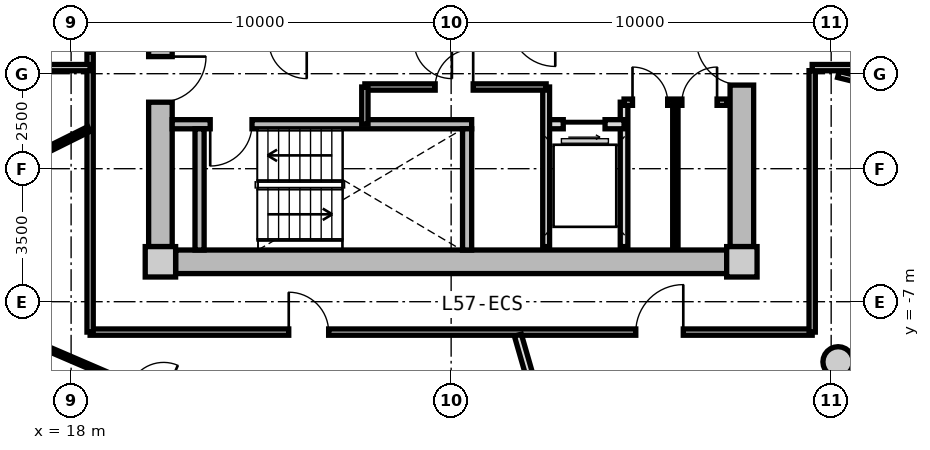
"""IFC4 building model, lengths in metres.
Left out: names, types, materials, properties, quantities, classifications, styles, units other than length and angle.
Written with IfcOpenShell. Run it as: python <this file> out.ifc"""

import sys

from ifc_helpers import new_model, si_unit, direction, frame, frame_2d, origin, origin_2d, place, context, subcontext, project, spatial, rectangle, circle, extrude, source, transform, mapped, element, fill, save


model = new_model("IFC4")
c1 = context("Model", 3, precision=1e-05, world=origin(), true_north=direction((0.0, 1.0)))
c2 = subcontext(c1, "Body", "Model", "MODEL_VIEW")
j1 = project(units=[si_unit("LENGTHUNIT", "METRE"), si_unit("PLANEANGLEUNIT", "RADIAN")], contexts=[c1])
p1 = place(None, origin())
s1 = spatial("IfcSite", under=j1, at=p1, CompositionType="ELEMENT")
p2 = place(p1, origin())
s2 = spatial("IfcBuilding", under=s1, at=p2, CompositionType="ELEMENT")
p3 = place(p2, frame((0.0, 0.0, 183.1)))
s3 = spatial("IfcBuildingStorey", under=s2, at=p3, CompositionType="ELEMENT", Elevation=183.1)
m1 = source(origin(), c2, "Body", "SweptSolid", [
    extrude(rectangle(XDim=0.8, YDim=0.8, at=origin_2d()), origin(), (0.0, 0.0, 1.0), 3.05),
])
for number, where, z_axis, x_axis in (
    (1, (20.35, -5.95, 0.0), (0.0, 0.0, 1.0), (1.0, 0.0, 0.0)),
    (2, (35.65, -5.95, 0.0), (0.0, 0.0, 1.0), (1.0, 0.0, 0.0)),
):
    element("IfcColumn", number, at=place(p3, frame(where, z_axis=z_axis, x_axis=x_axis)), inside=s3, PredefinedType="COLUMN", context=c2, shape_type="MappedRepresentation", body=[
        mapped(m1, transform((0.0, 0.0, 0.0), x_axis=(1.0, 0.0, 0.0), y_axis=(0.0, 1.0, 0.0), z_axis=(0.0, 0.0, 1.0), scale=1.0)),
    ])
m2 = source(origin(), c2, "Body", "SweptSolid", [
    extrude(rectangle(XDim=14.5, YDim=0.62, at=frame_2d((7.25, 0.0))), origin(), (0.0, 0.0, 1.0), 2.73),
])
p4 = place(p3, frame((35.25, -5.95, 0.0), z_axis=(0.0, 0.0, 1.0), x_axis=(-1.0, 0.0, 0.0)))
e3 = element("IfcWall", 3, at=p4, inside=s3, PredefinedType="SHEAR", context=c2, shape_type="MappedRepresentation", body=[
    mapped(m2, transform((0.0, 0.0, 0.0), x_axis=(1.0, 0.0, 0.0), y_axis=(0.0, 1.0, 0.0), z_axis=(0.0, 0.0, 1.0), scale=1.0)),
])
m3 = source(origin(), c2, "Body", "SweptSolid", [
    extrude(rectangle(XDim=11.1, YDim=0.62, at=frame_2d((5.55, 0.0))), origin(), (0.0, 0.0, 1.0), 2.73),
])
p5 = place(p3, frame((20.35, -5.55, 0.0), z_axis=(0.0, 0.0, 1.0), x_axis=(0.0, 1.0, 0.0)))
e4 = element("IfcWall", 4, at=p5, inside=s3, PredefinedType="SHEAR", context=c2, shape_type="MappedRepresentation", body=[
    mapped(m3, transform((0.0, 0.0, 0.0), x_axis=(1.0, 0.0, 0.0), y_axis=(0.0, 1.0, 0.0), z_axis=(0.0, 0.0, 1.0), scale=1.0)),
])
p6 = place(p5, frame((3.8, 0.0, 0.0)))
e5 = element("IfcOpeningElement", 5, at=p6, cuts=e4, PredefinedType="OPENING", context=c2, shape_type="SweptSolid", body=[
    extrude(rectangle(XDim=1.2, YDim=2.15, at=frame_2d((0.6, 1.075))), frame((0.0, 0.32, 0.0), z_axis=(0.0, -1.0, 0.0), x_axis=(1.0, 0.0, 0.0)), (0.0, 0.0, 1.0), 0.64),
])
p7 = place(p3, frame((35.65, 5.55, 0.0), z_axis=(0.0, 0.0, 1.0), x_axis=(0.0, -1.0, 0.0)))
e6 = element("IfcWall", 6, at=p7, inside=s3, PredefinedType="SHEAR", context=c2, shape_type="MappedRepresentation", body=[
    mapped(m3, transform((0.0, 0.0, 0.0), x_axis=(1.0, 0.0, 0.0), y_axis=(0.0, 1.0, 0.0), z_axis=(0.0, 0.0, 1.0), scale=1.0)),
])
p8 = place(p7, frame((5.65, 0.0, 0.0)))
e7 = element("IfcOpeningElement", 7, at=p8, cuts=e6, PredefinedType="OPENING", context=c2, shape_type="SweptSolid", body=[
    extrude(rectangle(XDim=1.2, YDim=2.15, at=frame_2d((0.6, 1.075))), frame((0.0, 0.32, 0.0), z_axis=(0.0, -1.0, 0.0), x_axis=(1.0, 0.0, 0.0)), (0.0, 0.0, 1.0), 0.64),
])
m4 = source(origin(), c2, "Body", "SweptSolid", [
    extrude(circle(Radius=0.4, at=origin_2d()), origin(), (0.0, 0.0, 1.0), 3.05),
])
p9 = place(p3, frame((38.183, -8.584, 0.0), z_axis=(0.0, 0.0, 1.0), x_axis=(1.0, 0.0, 0.0)))
e8 = element("IfcColumn", 8, at=p9, inside=s3, PredefinedType="COLUMN", context=c2, shape_type="MappedRepresentation", body=[
    mapped(m4, transform((0.0, 0.0, 0.0), x_axis=(1.0, 0.0, 0.0), y_axis=(0.0, 1.0, 0.0), z_axis=(0.0, 0.0, 1.0), scale=1.0)),
])
m5 = source(origin(), c2, "Body", "SweptSolid", [
    extrude(rectangle(XDim=7.88, YDim=0.24, at=frame_2d((3.94, 0.0))), origin(), (0.0, 0.0, 1.0), 2.73),
])
p10 = place(p3, frame((20.66, -2.33, 0.0), z_axis=(0.0, 0.0, 1.0), x_axis=(1.0, 0.0, 0.0)))
e9 = element("IfcWall", 9, at=p10, inside=s3, PredefinedType="PARTITIONING", context=c2, shape_type="MappedRepresentation", body=[
    mapped(m5, transform((0.0, 0.0, 0.0), x_axis=(1.0, 0.0, 0.0), y_axis=(0.0, 1.0, 0.0), z_axis=(0.0, 0.0, 1.0), scale=1.0)),
])
p11 = place(p10, frame((1.0, 0.0, 0.0)))
e10 = element("IfcOpeningElement", 10, at=p11, cuts=e9, PredefinedType="OPENING", context=c2, shape_type="SweptSolid", body=[
    extrude(rectangle(XDim=1.1, YDim=2.15, at=frame_2d((0.55, 1.075))), frame((0.0, 0.13, 0.0), z_axis=(0.0, -1.0, 0.0), x_axis=(1.0, 0.0, 0.0)), (0.0, 0.0, 1.0), 0.26),
])
m6 = source(origin(), c2, "Body", "SweptSolid", [
    extrude(rectangle(XDim=3.19, YDim=0.24, at=frame_2d((1.595, 0.0))), origin(), (0.0, 0.0, 1.0), 2.73),
])
for number, where, z_axis, x_axis in (
    (11, (21.38, -5.64, 0.0), (0.0, 0.0, 1.0), (0.0, 1.0, 0.0)),
    (12, (28.42, -5.64, 0.0), (0.0, 0.0, 1.0), (0.0, 1.0, 0.0)),
):
    element("IfcWall", number, at=place(p3, frame(where, z_axis=z_axis, x_axis=x_axis)), inside=s3, PredefinedType="PARTITIONING", context=c2, shape_type="MappedRepresentation", body=[
        mapped(m6, transform((0.0, 0.0, 0.0), x_axis=(1.0, 0.0, 0.0), y_axis=(0.0, 1.0, 0.0), z_axis=(0.0, 0.0, 1.0), scale=1.0)),
    ])
m7 = source(origin(), c2, "Body", "SweptSolid", [
    extrude(rectangle(XDim=3.8, YDim=0.2, at=frame_2d((1.9, 0.0))), origin(), (0.0, 0.0, 1.0), 2.715),
])
p12 = place(p3, frame((32.55, -5.55, 0.0), z_axis=(0.0, 0.0, 1.0), x_axis=(0.0, 1.0, 0.0)))
e13 = element("IfcWall", 13, at=p12, inside=s3, PredefinedType="PARTITIONING", context=c2, shape_type="MappedRepresentation", body=[
    mapped(m7, transform((0.0, 0.0, 0.0), x_axis=(1.0, 0.0, 0.0), y_axis=(0.0, 1.0, 0.0), z_axis=(0.0, 0.0, 1.0), scale=1.0)),
])
m8 = source(origin(), c2, "Body", "SweptSolid", [
    extrude(rectangle(XDim=2.05, YDim=0.24, at=frame_2d((1.025, 0.0))), origin(), (0.0, 0.0, 1.0), 2.715),
])
p13 = place(p3, frame((30.5, -2.33, 0.0), z_axis=(0.0, 0.0, 1.0), x_axis=(1.0, 0.0, 0.0)))
e14 = element("IfcWall", 14, at=p13, inside=s3, PredefinedType="PARTITIONING", context=c2, shape_type="MappedRepresentation", body=[
    mapped(m8, transform((0.0, 0.0, 0.0), x_axis=(1.0, 0.0, 0.0), y_axis=(0.0, 1.0, 0.0), z_axis=(0.0, 0.0, 1.0), scale=1.0)),
])
p14 = place(p13, frame((0.45, 0.0, 0.0)))
e15 = element("IfcOpeningElement", 15, at=p14, cuts=e14, PredefinedType="OPENING", context=c2, shape_type="SweptSolid", body=[
    extrude(rectangle(XDim=1.1, YDim=2.2, at=frame_2d((0.55, 1.1))), frame((0.0, 0.13, 0.0), z_axis=(0.0, -1.0, 0.0), x_axis=(1.0, 0.0, 0.0)), (0.0, 0.0, 1.0), 0.26),
])
m9 = source(origin(), c2, "Body", "SweptSolid", [
    extrude(rectangle(XDim=4.2, YDim=0.18, at=frame_2d((2.1, 0.0))), origin(), (0.0, 0.0, 1.0), 2.715),
])
p15 = place(p3, frame((30.5, -5.55, 0.0), z_axis=(0.0, 0.0, 1.0), x_axis=(0.0, 1.0, 0.0)))
e16 = element("IfcWall", 16, at=p15, inside=s3, PredefinedType="PARTITIONING", context=c2, shape_type="MappedRepresentation", body=[
    mapped(m9, transform((0.0, 0.0, 0.0), x_axis=(1.0, 0.0, 0.0), y_axis=(0.0, 1.0, 0.0), z_axis=(0.0, 0.0, 1.0), scale=1.0)),
])
m10 = source(origin(), c2, "Body", "SweptSolid", [
    extrude(rectangle(XDim=4.77, YDim=0.165, at=frame_2d((2.385, 0.0))), origin(), (0.0, 0.0, 1.0), 2.715),
])
p16 = place(p3, frame((25.73, -1.35, 0.0), z_axis=(0.0, 0.0, 1.0), x_axis=(1.0, 0.0, 0.0)))
e17 = element("IfcWall", 17, at=p16, inside=s3, PredefinedType="PARTITIONING", context=c2, shape_type="MappedRepresentation", body=[
    mapped(m10, transform((0.0, 0.0, 0.0), x_axis=(1.0, 0.0, 0.0), y_axis=(0.0, 1.0, 0.0), z_axis=(0.0, 0.0, 1.0), scale=1.0)),
])
p17 = place(p16, frame((1.85, 0.0, 0.0)))
e18 = element("IfcOpeningElement", 18, at=p17, cuts=e17, PredefinedType="OPENING", context=c2, shape_type="SweptSolid", body=[
    extrude(rectangle(XDim=1.0, YDim=2.1, at=frame_2d((0.5, 1.05))), frame((0.0, 0.093, 0.0), z_axis=(0.0, -1.0, 0.0), x_axis=(1.0, 0.0, 0.0)), (0.0, 0.0, 1.0), 0.185),
])
m11 = source(origin(), c2, "Body", "SweptSolid", [
    extrude(rectangle(XDim=0.98, YDim=0.165, at=frame_2d((0.49, 0.0))), origin(), (0.0, 0.0, 1.0), 2.715),
])
p18 = place(p3, frame((25.73, -2.33, 0.0), z_axis=(0.0, 0.0, 1.0), x_axis=(0.0, 1.0, 0.0)))
e19 = element("IfcWall", 19, at=p18, inside=s3, PredefinedType="PARTITIONING", context=c2, shape_type="MappedRepresentation", body=[
    mapped(m11, transform((0.0, 0.0, 0.0), x_axis=(1.0, 0.0, 0.0), y_axis=(0.0, 1.0, 0.0), z_axis=(0.0, 0.0, 1.0), scale=1.0)),
])
m12 = source(origin(), c2, "Body", "SweptSolid", [
    extrude(rectangle(XDim=2.7, YDim=0.165, at=frame_2d((1.35, 0.0))), origin(), (0.0, 0.0, 1.0), 2.715),
])
p19 = place(p3, frame((32.55, -1.75, 0.0), z_axis=(0.0, 0.0, 1.0), x_axis=(1.0, 0.0, 0.0)))
e20 = element("IfcWall", 20, at=p19, inside=s3, PredefinedType="PARTITIONING", context=c2, shape_type="MappedRepresentation", body=[
    mapped(m12, transform((0.0, 0.0, 0.0), x_axis=(1.0, 0.0, 0.0), y_axis=(0.0, 1.0, 0.0), z_axis=(0.0, 0.0, 1.0), scale=1.0)),
])
p20 = place(p19, frame((0.222, 0.0, 0.0)))
e21 = element("IfcOpeningElement", 21, at=p20, cuts=e20, PredefinedType="OPENING", context=c2, shape_type="SweptSolid", body=[
    extrude(rectangle(XDim=0.925, YDim=2.1, at=frame_2d((0.462, 1.05))), frame((0.0, 0.093, 0.0), z_axis=(0.0, -1.0, 0.0), x_axis=(1.0, 0.0, 0.0)), (0.0, 0.0, 1.0), 0.185),
])
p21 = place(p19, frame((1.522, 0.0, 0.0)))
e22 = element("IfcOpeningElement", 22, at=p21, cuts=e20, PredefinedType="OPENING", context=c2, shape_type="SweptSolid", body=[
    extrude(rectangle(XDim=0.925, YDim=2.1, at=frame_2d((0.462, 1.05))), frame((0.0, 0.093, 0.0), z_axis=(0.0, -1.0, 0.0), x_axis=(1.0, 0.0, 0.0)), (0.0, 0.0, 1.0), 0.185),
])
m13 = source(origin(), c2, "Body", "SweptSolid", [
    extrude(rectangle(XDim=3.8, YDim=0.14, at=frame_2d((1.9, 0.0))), origin(), (0.0, 0.0, 1.0), 2.715),
])
p22 = place(p3, frame((33.9, -5.55, 0.0), z_axis=(0.0, 0.0, 1.0), x_axis=(0.0, 1.0, 0.0)))
e23 = element("IfcWall", 23, at=p22, inside=s3, PredefinedType="PARTITIONING", context=c2, shape_type="MappedRepresentation", body=[
    mapped(m13, transform((0.0, 0.0, 0.0), x_axis=(1.0, 0.0, 0.0), y_axis=(0.0, 1.0, 0.0), z_axis=(0.0, 0.0, 1.0), scale=1.0)),
])
m14 = source(origin(), c2, "Body", "SweptSolid", [
    extrude(rectangle(XDim=19.0, YDim=0.165, at=frame_2d((9.5, 0.0))), origin(), (0.0, 0.0, 1.0), 2.715),
])
p23 = place(p3, frame((37.5, -7.8, 0.0), z_axis=(0.0, 0.0, 1.0), x_axis=(-1.0, 0.0, 0.0)))
e24 = element("IfcWall", 24, at=p23, inside=s3, PredefinedType="PARTITIONING", context=c2, shape_type="MappedRepresentation", body=[
    mapped(m14, transform((0.0, 0.0, 0.0), x_axis=(1.0, 0.0, 0.0), y_axis=(0.0, 1.0, 0.0), z_axis=(0.0, 0.0, 1.0), scale=1.0)),
])
p24 = place(p23, frame((12.723, 0.0, 0.0)))
e25 = element("IfcOpeningElement", 25, at=p24, cuts=e24, PredefinedType="OPENING", context=c2, shape_type="SweptSolid", body=[
    extrude(rectangle(XDim=1.05, YDim=2.15, at=frame_2d((0.525, 1.075))), frame((0.0, 0.093, 0.0), z_axis=(0.0, -1.0, 0.0), x_axis=(1.0, 0.0, 0.0)), (0.0, 0.0, 1.0), 0.185),
])
p25 = place(p23, frame((3.392, 0.0, 0.0)))
e26 = element("IfcOpeningElement", 26, at=p25, cuts=e24, PredefinedType="OPENING", context=c2, shape_type="SweptSolid", body=[
    extrude(rectangle(XDim=1.25, YDim=2.2, at=frame_2d((0.625, 1.1))), frame((0.0, 0.093, 0.0), z_axis=(0.0, -1.0, 0.0), x_axis=(1.0, 0.0, 0.0)), (0.0, 0.0, 1.0), 0.185),
])
m15 = source(origin(), c2, "Body", "SweptSolid", [
    extrude(rectangle(XDim=7.365, YDim=0.165, at=frame_2d((3.682, 0.0))), origin(), (0.0, 0.0, 1.0), 2.715),
])
p26 = place(p3, frame((18.5, -7.8, 0.0), z_axis=(0.0, 0.0, 1.0), x_axis=(0.0, 1.0, 0.0)))
e27 = element("IfcWall", 27, at=p26, inside=s3, PredefinedType="PARTITIONING", context=c2, shape_type="MappedRepresentation", body=[
    mapped(m15, transform((0.0, 0.0, 0.0), x_axis=(1.0, 0.0, 0.0), y_axis=(0.0, 1.0, 0.0), z_axis=(0.0, 0.0, 1.0), scale=1.0)),
])
m16 = source(origin(), c2, "Body", "SweptSolid", [
    extrude(rectangle(XDim=6.88, YDim=0.165, at=frame_2d((3.44, 0.0))), origin(), (0.0, 0.0, 1.0), 2.715),
])
p27 = place(p3, frame((37.5, -0.92, 0.0), z_axis=(0.0, 0.0, 1.0), x_axis=(0.0, -1.0, 0.0)))
e28 = element("IfcWall", 28, at=p27, inside=s3, PredefinedType="PARTITIONING", context=c2, shape_type="MappedRepresentation", body=[
    mapped(m16, transform((0.0, 0.0, 0.0), x_axis=(1.0, 0.0, 0.0), y_axis=(0.0, 1.0, 0.0), z_axis=(0.0, 0.0, 1.0), scale=1.0)),
])
m17 = source(origin(), c2, "Body", "SweptSolid", [
    extrude(rectangle(XDim=5.564, YDim=0.165, at=frame_2d((2.782, 0.0))), origin(), (0.0, 0.0, 1.0), 2.265),
])
p28 = place(p3, frame((38.19, -1.02, 0.0), z_axis=(0.0, 0.0, 1.0), x_axis=(0.97031260977, -0.241854169533, 0.0)))
e29 = element("IfcWall", 29, at=p28, inside=s3, PredefinedType="PARTITIONING", context=c2, shape_type="MappedRepresentation", body=[
    mapped(m17, transform((0.0, 0.0, 0.0), x_axis=(1.0, 0.0, 0.0), y_axis=(0.0, 1.0, 0.0), z_axis=(0.0, 0.0, 1.0), scale=1.0)),
])
m18 = source(origin(), c2, "Body", "SweptSolid", [
    extrude(rectangle(XDim=8.189, YDim=0.165, at=frame_2d((4.094, 0.0))), origin(), (0.0, 0.0, 1.0), 2.715),
])
p29 = place(p3, frame((18.5, -0.84, 0.0), z_axis=(0.0, 0.0, 1.0), x_axis=(-1.0, 0.0, 0.0)))
e30 = element("IfcWall", 30, at=p29, inside=s3, PredefinedType="PARTITIONING", context=c2, shape_type="MappedRepresentation", body=[
    mapped(m18, transform((0.0, 0.0, 0.0), x_axis=(1.0, 0.0, 0.0), y_axis=(0.0, 1.0, 0.0), z_axis=(0.0, 0.0, 1.0), scale=1.0)),
])
m19 = source(origin(), c2, "Body", "SweptSolid", [
    extrude(rectangle(XDim=6.139, YDim=0.165, at=frame_2d((3.069, 0.0))), origin(), (0.0, 0.0, 1.0), 2.715),
])
p30 = place(p3, frame((43.639, -0.84, 0.0), z_axis=(0.0, 0.0, 1.0), x_axis=(-1.0, 0.0, 0.0)))
e31 = element("IfcWall", 31, at=p30, inside=s3, PredefinedType="PARTITIONING", context=c2, shape_type="MappedRepresentation", body=[
    mapped(m19, transform((0.0, 0.0, 0.0), x_axis=(1.0, 0.0, 0.0), y_axis=(0.0, 1.0, 0.0), z_axis=(0.0, 0.0, 1.0), scale=1.0)),
])
m20 = source(origin(), c2, "Body", "SweptSolid", [
    extrude(rectangle(XDim=6.035, YDim=0.19, at=frame_2d((3.018, 0.0))), origin(), (0.0, 0.0, 1.0), 2.265),
])
p31 = place(p3, frame((29.756, -7.88, 0.0), z_axis=(0.0, 0.0, 1.0), x_axis=(0.276809454862, -0.960924828329, 0.0)))
e32 = element("IfcWall", 32, at=p31, inside=s3, PredefinedType="PARTITIONING", context=c2, shape_type="MappedRepresentation", body=[
    mapped(m20, transform((0.0, 0.0, 0.0), x_axis=(1.0, 0.0, 0.0), y_axis=(0.0, 1.0, 0.0), z_axis=(0.0, 0.0, 1.0), scale=1.0)),
])
m21 = source(origin(), c2, "Body", "SweptSolid", [
    extrude(rectangle(XDim=7.344, YDim=0.115, at=frame_2d((3.672, 0.0))), origin(), (0.0, 0.0, 1.0), 2.715),
])
p32 = place(p3, frame((16.624, -7.91, 0.0), z_axis=(0.0, 0.0, 1.0), x_axis=(0.918735287054, -0.3948739955, 0.0)))
e33 = element("IfcWall", 33, at=p32, inside=s3, PredefinedType="PARTITIONING", context=c2, shape_type="MappedRepresentation", body=[
    mapped(m21, transform((0.0, 0.0, 0.0), x_axis=(1.0, 0.0, 0.0), y_axis=(0.0, 1.0, 0.0), z_axis=(0.0, 0.0, 1.0), scale=1.0)),
])
p33 = place(p32, frame((3.197, 0.0, 0.0)))
e34 = element("IfcOpeningElement", 34, at=p33, cuts=e33, PredefinedType="OPENING", context=c2, shape_type="SweptSolid", body=[
    extrude(rectangle(XDim=0.95, YDim=2.1, at=frame_2d((0.475, 1.05))), frame((0.0, 0.067, 0.0), z_axis=(0.0, -1.0, 0.0), x_axis=(1.0, 0.0, 0.0)), (0.0, 0.0, 1.0), 0.135),
])
m22 = source(origin(), c2, "Body", "SweptSolid", [
    extrude(rectangle(XDim=2.403, YDim=0.14, at=frame_2d((1.201, 0.0))), origin(), (0.0, 0.0, 1.0), 2.715),
])
p34 = place(p3, frame((18.47, -2.456, 0.0), z_axis=(0.0, 0.0, 1.0), x_axis=(-0.895339866084, -0.445383569748, 0.0)))
e35 = element("IfcWall", 35, at=p34, inside=s3, PredefinedType="PARTITIONING", context=c2, shape_type="MappedRepresentation", body=[
    mapped(m22, transform((0.0, 0.0, 0.0), x_axis=(1.0, 0.0, 0.0), y_axis=(0.0, 1.0, 0.0), z_axis=(0.0, 0.0, 1.0), scale=1.0)),
])
m23 = source(origin(), c2, "Body", "SweptSolid", [
    extrude(rectangle(XDim=1.1, YDim=2.15, at=frame_2d((0.55, 1.075))), frame((0.0, 0.025, 0.0), z_axis=(0.0, -1.0, 0.0), x_axis=(1.0, 0.0, 0.0)), (0.0, 0.0, 1.0), 0.05),
])
p35 = place(p11, frame((1.1, 0.0, 0.0), z_axis=(0.0, 0.0, 1.0), x_axis=(-1.0, 0.0, 0.0)))
e36 = element("IfcDoor", 36, at=p35, inside=s3, OperationType="SINGLE_SWING_RIGHT", PredefinedType="DOOR", context=c2, shape_type="MappedRepresentation", body=[
    mapped(m23, transform((0.0, 0.0, 0.0), x_axis=(1.0, 0.0, 0.0), y_axis=(0.0, 1.0, 0.0), z_axis=(0.0, 0.0, 1.0), scale=1.0)),
])
fill(e10, e36)
m24 = source(origin(), c2, "Body", "SweptSolid", [
    extrude(rectangle(XDim=1.2, YDim=2.15, at=frame_2d((0.6, 1.075))), frame((0.0, 0.025, 0.0), z_axis=(0.0, -1.0, 0.0), x_axis=(1.0, 0.0, 0.0)), (0.0, 0.0, 1.0), 0.05),
])
p36 = place(p6, frame((1.2, 0.0, 0.0), z_axis=(0.0, 0.0, 1.0), x_axis=(-1.0, 0.0, 0.0)))
e37 = element("IfcDoor", 37, at=p36, inside=s3, OperationType="SINGLE_SWING_LEFT", PredefinedType="DOOR", context=c2, shape_type="MappedRepresentation", body=[
    mapped(m24, transform((0.0, 0.0, 0.0), x_axis=(1.0, 0.0, 0.0), y_axis=(0.0, 1.0, 0.0), z_axis=(0.0, 0.0, 1.0), scale=1.0)),
])
fill(e5, e37)
p37 = place(p8, frame((1.2, 0.0, 0.0), z_axis=(0.0, 0.0, 1.0), x_axis=(-1.0, 0.0, 0.0)))
e38 = element("IfcDoor", 38, at=p37, inside=s3, OperationType="SINGLE_SWING_RIGHT", PredefinedType="DOOR", context=c2, shape_type="MappedRepresentation", body=[
    mapped(m24, transform((0.0, 0.0, 0.0), x_axis=(1.0, 0.0, 0.0), y_axis=(0.0, 1.0, 0.0), z_axis=(0.0, 0.0, 1.0), scale=1.0)),
])
fill(e7, e38)
m25 = source(origin(), c2, "Body", "SweptSolid", [
    extrude(rectangle(XDim=1.1, YDim=2.2, at=frame_2d((0.55, 1.1))), frame((0.0, 0.025, 0.0), z_axis=(0.0, -1.0, 0.0), x_axis=(1.0, 0.0, 0.0)), (0.0, 0.0, 1.0), 0.05),
])
p38 = place(p14, frame((1.1, 0.0, 0.0), z_axis=(0.0, 0.0, 1.0), x_axis=(-1.0, 0.0, 0.0)))
e39 = element("IfcDoor", 39, at=p38, inside=s3, OperationType="SLIDING_TO_RIGHT", PredefinedType="DOOR", context=c2, shape_type="MappedRepresentation", body=[
    mapped(m25, transform((0.0, 0.0, 0.0), x_axis=(1.0, 0.0, 0.0), y_axis=(0.0, 1.0, 0.0), z_axis=(0.0, 0.0, 1.0), scale=1.0)),
])
fill(e15, e39)
m26 = source(origin(), c2, "Body", "SweptSolid", [
    extrude(rectangle(XDim=1.0, YDim=2.1, at=frame_2d((0.5, 1.05))), frame((0.0, 0.025, 0.0), z_axis=(0.0, -1.0, 0.0), x_axis=(1.0, 0.0, 0.0)), (0.0, 0.0, 1.0), 0.05),
])
p39 = place(p17, origin())
e40 = element("IfcDoor", 40, at=p39, inside=s3, OperationType="SINGLE_SWING_RIGHT", PredefinedType="DOOR", context=c2, shape_type="MappedRepresentation", body=[
    mapped(m26, transform((0.0, 0.0, 0.0), x_axis=(1.0, 0.0, 0.0), y_axis=(0.0, 1.0, 0.0), z_axis=(0.0, 0.0, 1.0), scale=1.0)),
])
fill(e18, e40)
m27 = source(origin(), c2, "Body", "SweptSolid", [
    extrude(rectangle(XDim=0.925, YDim=2.1, at=frame_2d((0.462, 1.05))), frame((0.0, 0.025, 0.0), z_axis=(0.0, -1.0, 0.0), x_axis=(1.0, 0.0, 0.0)), (0.0, 0.0, 1.0), 0.05),
])
p40 = place(p20, origin())
e41 = element("IfcDoor", 41, at=p40, inside=s3, OperationType="SINGLE_SWING_LEFT", PredefinedType="DOOR", context=c2, shape_type="MappedRepresentation", body=[
    mapped(m27, transform((0.0, 0.0, 0.0), x_axis=(1.0, 0.0, 0.0), y_axis=(0.0, 1.0, 0.0), z_axis=(0.0, 0.0, 1.0), scale=1.0)),
])
fill(e21, e41)
p41 = place(p21, origin())
e42 = element("IfcDoor", 42, at=p41, inside=s3, OperationType="SINGLE_SWING_RIGHT", PredefinedType="DOOR", context=c2, shape_type="MappedRepresentation", body=[
    mapped(m27, transform((0.0, 0.0, 0.0), x_axis=(1.0, 0.0, 0.0), y_axis=(0.0, 1.0, 0.0), z_axis=(0.0, 0.0, 1.0), scale=1.0)),
])
fill(e22, e42)
m28 = source(origin(), c2, "Body", "SweptSolid", [
    extrude(rectangle(XDim=1.05, YDim=2.15, at=frame_2d((0.525, 1.075))), frame((0.0, 0.025, 0.0), z_axis=(0.0, -1.0, 0.0), x_axis=(1.0, 0.0, 0.0)), (0.0, 0.0, 1.0), 0.05),
])
p42 = place(p24, frame((1.05, 0.0, 0.0), z_axis=(0.0, 0.0, 1.0), x_axis=(-1.0, 0.0, 0.0)))
e43 = element("IfcDoor", 43, at=p42, inside=s3, OperationType="SINGLE_SWING_LEFT", PredefinedType="DOOR", context=c2, shape_type="MappedRepresentation", body=[
    mapped(m28, transform((0.0, 0.0, 0.0), x_axis=(1.0, 0.0, 0.0), y_axis=(0.0, 1.0, 0.0), z_axis=(0.0, 0.0, 1.0), scale=1.0)),
])
fill(e25, e43)
m29 = source(origin(), c2, "Body", "SweptSolid", [
    extrude(rectangle(XDim=1.25, YDim=2.2, at=frame_2d((0.625, 1.1))), frame((0.0, 0.025, 0.0), z_axis=(0.0, -1.0, 0.0), x_axis=(1.0, 0.0, 0.0)), (0.0, 0.0, 1.0), 0.05),
])
p43 = place(p25, frame((1.25, 0.0, 0.0), z_axis=(0.0, 0.0, 1.0), x_axis=(-1.0, 0.0, 0.0)))
e44 = element("IfcDoor", 44, at=p43, inside=s3, OperationType="SINGLE_SWING_RIGHT", PredefinedType="DOOR", context=c2, shape_type="MappedRepresentation", body=[
    mapped(m29, transform((0.0, 0.0, 0.0), x_axis=(1.0, 0.0, 0.0), y_axis=(0.0, 1.0, 0.0), z_axis=(0.0, 0.0, 1.0), scale=1.0)),
])
fill(e26, e44)
save(model, sys.argv[1])
